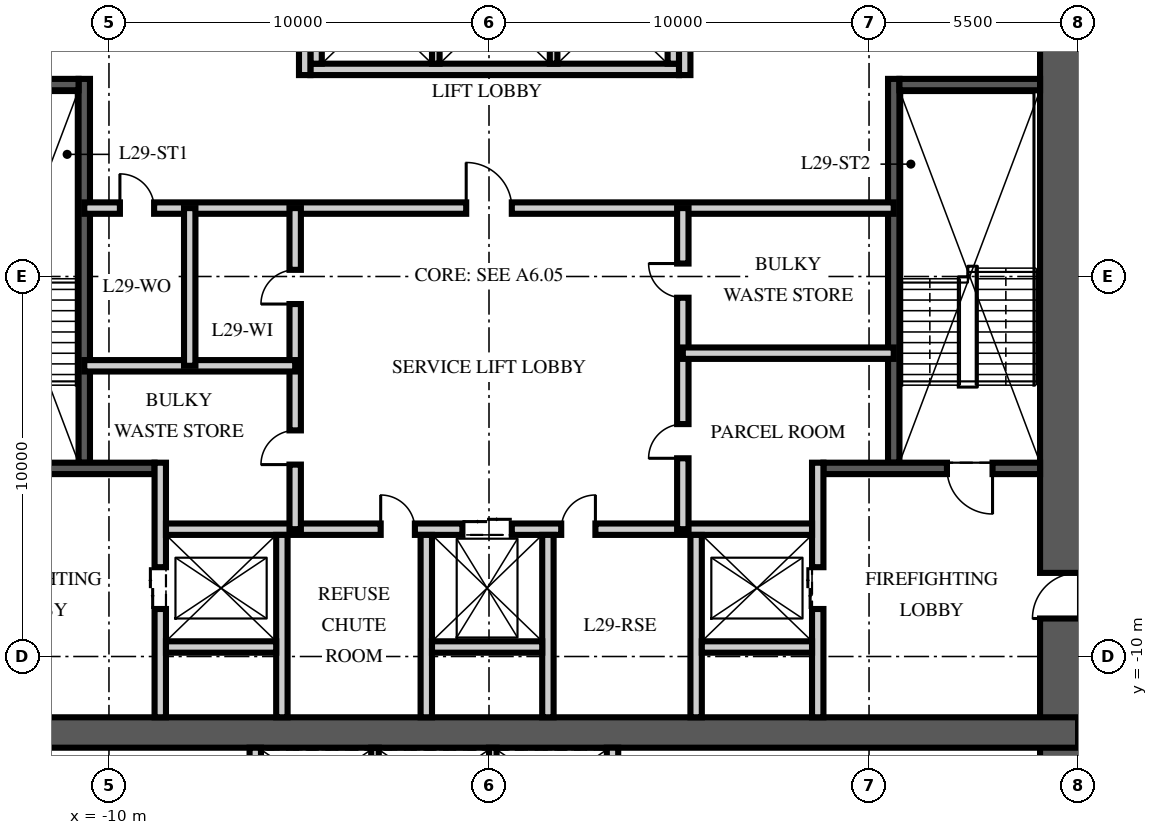
"""IFC4 building model, lengths in metres.
Left out: names, types, materials, properties, quantities, classifications, styles, units other than length and angle.
Written with IfcOpenShell. Run it as: python <this file> out.ifc"""

import sys

from ifc_helpers import new_model, si_unit, direction, frame, frame_2d, origin, place, context, subcontext, project, spatial, rectangle, extrude, element, fill, save


model = new_model("IFC4")
c1 = context("Model", 3, precision=1e-05, world=origin(), true_north=direction((0.0, 1.0)))
c2 = subcontext(c1, "Body", "Model", "MODEL_VIEW")
j1 = project(units=[si_unit("LENGTHUNIT", "METRE"), si_unit("PLANEANGLEUNIT", "RADIAN")], contexts=[c1])
p1 = place(None, origin())
s1 = spatial("IfcSite", under=j1, at=p1, CompositionType="ELEMENT")
p2 = place(p1, origin())
s2 = spatial("IfcBuilding", under=s1, at=p2, CompositionType="ELEMENT")
p3 = place(p2, frame((0.0, 0.0, 118.5)))
s3 = spatial("IfcBuildingStorey", under=s2, at=p3, CompositionType="ELEMENT", Elevation=118.5)
p4 = place(p3, frame((15.5, -15.5, -0.25), z_axis=(0.0, 0.0, 1.0), x_axis=(0.0, 1.0, 0.0)))
e1 = element("IfcWall", 1, at=p4, inside=s3, PredefinedType="SHEAR", context=c2, shape_type="SweptSolid", body=[
    extrude(rectangle(XDim=31.0, YDim=2.0, at=frame_2d((15.5, 0.0))), origin(), (0.0, 0.0, 1.0), 3.75),
])
p5 = place(p4, frame((6.5, 0.0, 0.25)))
e2 = element("IfcOpeningElement", 2, at=p5, cuts=e1, PredefinedType="OPENING", context=c2, shape_type="SweptSolid", body=[
    extrude(rectangle(XDim=1.2, YDim=2.1, at=frame_2d((0.6, 1.05))), frame((0.0, 1.01, 0.0), z_axis=(0.0, -1.0, 0.0), x_axis=(1.0, 0.0, 0.0)), (0.0, 0.0, 1.0), 2.02),
])
p6 = place(p4, frame((23.0, 0.0, 0.25)))
e3 = element("IfcOpeningElement", 3, at=p6, cuts=e1, PredefinedType="OPENING", context=c2, shape_type="SweptSolid", body=[
    extrude(rectangle(XDim=1.8, YDim=2.1, at=frame_2d((0.9, 1.05))), frame((0.0, 1.01, 0.0), z_axis=(0.0, -1.0, 0.0), x_axis=(1.0, 0.0, 0.0)), (0.0, 0.0, 1.0), 2.02),
])
p7 = place(p3, frame((-15.5, -12.0, -0.25), z_axis=(0.0, 0.0, 1.0), x_axis=(1.0, 0.0, 0.0)))
e4 = element("IfcWall", 4, at=p7, inside=s3, PredefinedType="SHEAR", context=c2, shape_type="SweptSolid", body=[
    extrude(rectangle(XDim=31.0, YDim=0.8, at=frame_2d((15.5, 0.0))), origin(), (0.0, 0.0, 1.0), 3.75),
])
p8 = place(p3, frame((-10.65, -4.9, 0.0), z_axis=(0.0, 0.0, 1.0), x_axis=(0.0, 1.0, 0.0)))
e5 = element("IfcWall", 5, at=p8, inside=s3, PredefinedType="SOLIDWALL", context=c2, shape_type="SweptSolid", body=[
    extrude(rectangle(XDim=10.1, YDim=0.3, at=frame_2d((5.05, 0.0))), origin(), (0.0, 0.0, 1.0), 3.5),
])
p9 = place(p3, frame((-14.5, -5.05, 0.0), z_axis=(0.0, 0.0, 1.0), x_axis=(1.0, 0.0, 0.0)))
e6 = element("IfcWall", 6, at=p9, inside=s3, PredefinedType="SOLIDWALL", context=c2, shape_type="SweptSolid", body=[
    extrude(rectangle(XDim=5.7, YDim=0.3, at=frame_2d((2.85, 0.0))), origin(), (0.0, 0.0, 1.0), 3.5),
])
p10 = place(p9, frame((1.25, 0.0, 0.0)))
e7 = element("IfcOpeningElement", 7, at=p10, cuts=e6, PredefinedType="OPENING", context=c2, shape_type="SweptSolid", body=[
    extrude(rectangle(XDim=1.2, YDim=2.1, at=frame_2d((0.6, 1.05))), frame((0.0, 0.16, 0.0), z_axis=(0.0, -1.0, 0.0), x_axis=(1.0, 0.0, 0.0)), (0.0, 0.0, 1.0), 0.32),
])
p11 = place(p3, frame((-14.5, 5.05, 0.0), z_axis=(0.0, 0.0, 1.0), x_axis=(1.0, 0.0, 0.0)))
e8 = element("IfcWall", 8, at=p11, inside=s3, PredefinedType="SOLIDWALL", context=c2, shape_type="SweptSolid", body=[
    extrude(rectangle(XDim=3.7, YDim=0.3, at=frame_2d((1.85, 0.0))), origin(), (0.0, 0.0, 1.0), 3.5),
])
p12 = place(p3, frame((-8.65, -11.6, 0.0), z_axis=(0.0, 0.0, 1.0), x_axis=(0.0, 1.0, 0.0)))
e9 = element("IfcWall", 9, at=p12, inside=s3, PredefinedType="PARTITIONING", context=c2, shape_type="SweptSolid", body=[
    extrude(rectangle(XDim=6.7, YDim=0.3, at=frame_2d((3.35, 0.0))), origin(), (0.0, 0.0, 1.0), 3.5),
])
p13 = place(p12, frame((2.85, 0.0, 0.0)))
e10 = element("IfcOpeningElement", 10, at=p13, cuts=e9, PredefinedType="OPENING", context=c2, shape_type="SweptSolid", body=[
    extrude(rectangle(XDim=1.1, YDim=2.1, at=frame_2d((0.55, 1.05))), frame((0.0, 0.16, 0.0), z_axis=(0.0, -1.0, 0.0), x_axis=(1.0, 0.0, 0.0)), (0.0, 0.0, 1.0), 0.32),
])
p14 = place(p3, frame((10.65, -4.9, 0.0), z_axis=(0.0, 0.0, 1.0), x_axis=(0.0, 1.0, 0.0)))
e11 = element("IfcWall", 11, at=p14, inside=s3, PredefinedType="SOLIDWALL", context=c2, shape_type="SweptSolid", body=[
    extrude(rectangle(XDim=10.1, YDim=0.3, at=frame_2d((5.05, 0.0))), origin(), (0.0, 0.0, 1.0), 3.5),
])
p15 = place(p3, frame((14.5, -5.05, 0.0), z_axis=(0.0, 0.0, 1.0), x_axis=(-1.0, 0.0, 0.0)))
e12 = element("IfcWall", 12, at=p15, inside=s3, PredefinedType="SOLIDWALL", context=c2, shape_type="SweptSolid", body=[
    extrude(rectangle(XDim=5.7, YDim=0.3, at=frame_2d((2.85, 0.0))), origin(), (0.0, 0.0, 1.0), 3.5),
])
p16 = place(p15, frame((1.25, 0.0, 0.0)))
e13 = element("IfcOpeningElement", 13, at=p16, cuts=e12, PredefinedType="OPENING", context=c2, shape_type="SweptSolid", body=[
    extrude(rectangle(XDim=1.2, YDim=2.1, at=frame_2d((0.6, 1.05))), frame((0.0, 0.16, 0.0), z_axis=(0.0, -1.0, 0.0), x_axis=(1.0, 0.0, 0.0)), (0.0, 0.0, 1.0), 0.32),
])
p17 = place(p3, frame((14.5, 5.05, 0.0), z_axis=(0.0, 0.0, 1.0), x_axis=(-1.0, 0.0, 0.0)))
e14 = element("IfcWall", 14, at=p17, inside=s3, PredefinedType="SOLIDWALL", context=c2, shape_type="SweptSolid", body=[
    extrude(rectangle(XDim=3.7, YDim=0.3, at=frame_2d((1.85, 0.0))), origin(), (0.0, 0.0, 1.0), 3.5),
])
p18 = place(p3, frame((8.65, -11.6, 0.0), z_axis=(0.0, 0.0, 1.0), x_axis=(0.0, 1.0, 0.0)))
e15 = element("IfcWall", 15, at=p18, inside=s3, PredefinedType="PARTITIONING", context=c2, shape_type="SweptSolid", body=[
    extrude(rectangle(XDim=6.7, YDim=0.3, at=frame_2d((3.35, 0.0))), origin(), (0.0, 0.0, 1.0), 3.5),
])
p19 = place(p18, frame((2.85, 0.0, 0.0)))
e16 = element("IfcOpeningElement", 16, at=p19, cuts=e15, PredefinedType="OPENING", context=c2, shape_type="SweptSolid", body=[
    extrude(rectangle(XDim=1.1, YDim=2.1, at=frame_2d((0.55, 1.05))), frame((0.0, 0.16, 0.0), z_axis=(0.0, -1.0, 0.0), x_axis=(1.0, 0.0, 0.0)), (0.0, 0.0, 1.0), 0.32),
])
p20 = place(p3, frame((-8.5, -6.65, 0.0), z_axis=(0.0, 0.0, 1.0), x_axis=(1.0, 0.0, 0.0)))
e17 = element("IfcWall", 17, at=p20, inside=s3, PredefinedType="PARTITIONING", context=c2, shape_type="SweptSolid", body=[
    extrude(rectangle(XDim=17.0, YDim=0.3, at=frame_2d((8.5, 0.0))), origin(), (0.0, 0.0, 1.0), 3.5),
])
p21 = place(p20, frame((7.8, 0.0, 0.0)))
e18 = element("IfcOpeningElement", 18, at=p21, cuts=e17, PredefinedType="OPENING", context=c2, shape_type="SweptSolid", body=[
    extrude(rectangle(XDim=1.3, YDim=2.4, at=frame_2d((0.65, 1.2))), frame((0.0, 0.16, 0.0), z_axis=(0.0, -1.0, 0.0), x_axis=(1.0, 0.0, 0.0)), (0.0, 0.0, 1.0), 0.32),
])
p22 = place(p20, frame((5.65, 0.0, 0.0)))
e19 = element("IfcOpeningElement", 19, at=p22, cuts=e17, PredefinedType="OPENING", context=c2, shape_type="SweptSolid", body=[
    extrude(rectangle(XDim=0.9, YDim=2.1, at=frame_2d((0.45, 1.05))), frame((0.0, 0.16, 0.0), z_axis=(0.0, -1.0, 0.0), x_axis=(1.0, 0.0, 0.0)), (0.0, 0.0, 1.0), 0.32),
])
p23 = place(p20, frame((10.4, 0.0, 0.0)))
e20 = element("IfcOpeningElement", 20, at=p23, cuts=e17, PredefinedType="OPENING", context=c2, shape_type="SweptSolid", body=[
    extrude(rectangle(XDim=0.9, YDim=2.1, at=frame_2d((0.45, 1.05))), frame((0.0, 0.16, 0.0), z_axis=(0.0, -1.0, 0.0), x_axis=(1.0, 0.0, 0.0)), (0.0, 0.0, 1.0), 0.32),
])
for number, where, z_axis, x_axis in (
    (21, (-5.45, -11.6, 0.0), (0.0, 0.0, 1.0), (0.0, 1.0, 0.0)),
    (22, (-1.65, -11.6, 0.0), (0.0, 0.0, 1.0), (0.0, 1.0, 0.0)),
    (23, (1.55, -11.6, 0.0), (0.0, 0.0, 1.0), (0.0, 1.0, 0.0)),
    (24, (5.45, -11.6, 0.0), (0.0, 0.0, 1.0), (0.0, 1.0, 0.0)),
):
    element("IfcWall", number, at=place(p3, frame(where, z_axis=z_axis, x_axis=x_axis)), inside=s3, PredefinedType="PARTITIONING", context=c2, shape_type="SweptSolid", body=[
        extrude(rectangle(XDim=4.8, YDim=0.3, at=frame_2d((2.4, 0.0))), origin(), (0.0, 0.0, 1.0), 3.5),
    ])
for number, where, z_axis, x_axis in (
    (25, (-8.5, -9.75, 0.0), (0.0, 0.0, 1.0), (1.0, 0.0, 0.0)),
    (26, (-1.5, -9.75, 0.0), (0.0, 0.0, 1.0), (1.0, 0.0, 0.0)),
    (27, (5.6, -9.75, 0.0), (0.0, 0.0, 1.0), (1.0, 0.0, 0.0)),
):
    element("IfcWall", number, at=place(p3, frame(where, z_axis=z_axis, x_axis=x_axis)), inside=s3, PredefinedType="PARTITIONING", context=c2, shape_type="SweptSolid", body=[
        extrude(rectangle(XDim=2.9, YDim=0.3, at=frame_2d((1.45, 0.0))), origin(), (0.0, 0.0, 1.0), 3.5),
    ])
p24 = place(p3, frame((-4.7, 5.45, 0.0), z_axis=(0.0, 0.0, 1.0), x_axis=(1.0, 0.0, 0.0)))
e28 = element("IfcWall", 28, at=p24, inside=s3, PredefinedType="PARTITIONING", context=c2, shape_type="SweptSolid", body=[
    extrude(rectangle(XDim=9.7, YDim=0.3, at=frame_2d((4.85, 0.0))), origin(), (0.0, 0.0, 1.0), 3.5),
])
for number, where, z_axis, x_axis in (
    (29, (-4.55, 5.6, 0.0), (0.0, 0.0, 1.0), (0.0, 1.0, 0.0)),
    (30, (4.85, 5.6, 0.0), (0.0, 0.0, 1.0), (0.0, 1.0, 0.0)),
):
    element("IfcWall", number, at=place(p3, frame(where, z_axis=z_axis, x_axis=x_axis)), inside=s3, PredefinedType="PARTITIONING", context=c2, shape_type="SweptSolid", body=[
        extrude(rectangle(XDim=2.8, YDim=0.3, at=frame_2d((1.4, 0.0))), origin(), (0.0, 0.0, 1.0), 3.5),
    ])
for number, where, z_axis, x_axis in (
    (31, (-1.4, 5.6, 0.0), (0.0, 0.0, 1.0), (0.0, 1.0, 0.0)),
    (32, (1.7, 5.6, 0.0), (0.0, 0.0, 1.0), (0.0, 1.0, 0.0)),
):
    element("IfcWall", number, at=place(p3, frame(where, z_axis=z_axis, x_axis=x_axis)), inside=s3, PredefinedType="PARTITIONING", context=c2, shape_type="SweptSolid", body=[
        extrude(rectangle(XDim=2.8, YDim=0.2, at=frame_2d((1.4, 0.0))), origin(), (0.0, 0.0, 1.0), 3.5),
    ])
for number, where, z_axis, x_axis in (
    (33, (-6.15, -14.5, 0.0), (0.0, 0.0, 1.0), (0.0, 1.0, 0.0)),
    (34, (3.25, -14.5, 0.0), (0.0, 0.0, 1.0), (0.0, 1.0, 0.0)),
):
    element("IfcWall", number, at=place(p3, frame(where, z_axis=z_axis, x_axis=x_axis)), inside=s3, PredefinedType="PARTITIONING", context=c2, shape_type="SweptSolid", body=[
        extrude(rectangle(XDim=2.1, YDim=0.3, at=frame_2d((1.05, 0.0))), origin(), (0.0, 0.0, 1.0), 3.5),
    ])
for number, where, z_axis, x_axis in (
    (35, (-3.0, -14.5, 0.0), (0.0, 0.0, 1.0), (0.0, 1.0, 0.0)),
    (36, (0.1, -14.5, 0.0), (0.0, 0.0, 1.0), (0.0, 1.0, 0.0)),
):
    element("IfcWall", number, at=place(p3, frame(where, z_axis=z_axis, x_axis=x_axis)), inside=s3, PredefinedType="PARTITIONING", context=c2, shape_type="SweptSolid", body=[
        extrude(rectangle(XDim=2.1, YDim=0.2, at=frame_2d((1.05, 0.0))), origin(), (0.0, 0.0, 1.0), 3.5),
    ])
p25 = place(p3, frame((-10.65, 1.8, 0.0), z_axis=(0.0, 0.0, 1.0), x_axis=(1.0, 0.0, 0.0)))
e37 = element("IfcWall", 37, at=p25, inside=s3, PredefinedType="PARTITIONING", context=c2, shape_type="SweptSolid", body=[
    extrude(rectangle(XDim=21.3, YDim=0.3, at=frame_2d((10.65, 0.0))), origin(), (0.0, 0.0, 1.0), 3.5),
])
p26 = place(p25, frame((10.05, 0.0, 0.0)))
e38 = element("IfcOpeningElement", 38, at=p26, cuts=e37, PredefinedType="OPENING", context=c2, shape_type="SweptSolid", body=[
    extrude(rectangle(XDim=1.2, YDim=2.1, at=frame_2d((0.6, 1.05))), frame((0.0, 0.16, 0.0), z_axis=(0.0, -1.0, 0.0), x_axis=(1.0, 0.0, 0.0)), (0.0, 0.0, 1.0), 0.32),
])
p27 = place(p25, frame((0.938, 0.0, 0.0)))
e39 = element("IfcOpeningElement", 39, at=p27, cuts=e37, PredefinedType="OPENING", context=c2, shape_type="SweptSolid", body=[
    extrude(rectangle(XDim=0.9, YDim=2.1, at=frame_2d((0.45, 1.05))), frame((0.0, 0.16, 0.0), z_axis=(0.0, -1.0, 0.0), x_axis=(1.0, 0.0, 0.0)), (0.0, 0.0, 1.0), 0.32),
])
p28 = place(p3, frame((-5.1, -6.65, 0.0), z_axis=(0.0, 0.0, 1.0), x_axis=(0.0, 1.0, 0.0)))
e40 = element("IfcWall", 40, at=p28, inside=s3, PredefinedType="PARTITIONING", context=c2, shape_type="SweptSolid", body=[
    extrude(rectangle(XDim=8.45, YDim=0.3, at=frame_2d((4.225, 0.0))), origin(), (0.0, 0.0, 1.0), 3.5),
])
p29 = place(p28, frame((1.7, 0.0, 0.0)))
e41 = element("IfcOpeningElement", 41, at=p29, cuts=e40, PredefinedType="OPENING", context=c2, shape_type="SweptSolid", body=[
    extrude(rectangle(XDim=0.9, YDim=2.1, at=frame_2d((0.45, 1.05))), frame((0.0, 0.16, 0.0), z_axis=(0.0, -1.0, 0.0), x_axis=(1.0, 0.0, 0.0)), (0.0, 0.0, 1.0), 0.32),
])
p30 = place(p28, frame((5.925, 0.0, 0.0)))
e42 = element("IfcOpeningElement", 42, at=p30, cuts=e40, PredefinedType="OPENING", context=c2, shape_type="SweptSolid", body=[
    extrude(rectangle(XDim=0.9, YDim=2.1, at=frame_2d((0.45, 1.05))), frame((0.0, 0.16, 0.0), z_axis=(0.0, -1.0, 0.0), x_axis=(1.0, 0.0, 0.0)), (0.0, 0.0, 1.0), 0.32),
])
p31 = place(p3, frame((5.1, -6.65, 0.0), z_axis=(0.0, 0.0, 1.0), x_axis=(0.0, 1.0, 0.0)))
e43 = element("IfcWall", 43, at=p31, inside=s3, PredefinedType="PARTITIONING", context=c2, shape_type="SweptSolid", body=[
    extrude(rectangle(XDim=8.45, YDim=0.3, at=frame_2d((4.225, 0.0))), origin(), (0.0, 0.0, 1.0), 3.5),
])
p32 = place(p31, frame((1.866, 0.0, 0.0)))
e44 = element("IfcOpeningElement", 44, at=p32, cuts=e43, PredefinedType="OPENING", context=c2, shape_type="SweptSolid", body=[
    extrude(rectangle(XDim=0.9, YDim=2.1, at=frame_2d((0.45, 1.05))), frame((0.0, 0.16, 0.0), z_axis=(0.0, -1.0, 0.0), x_axis=(1.0, 0.0, 0.0)), (0.0, 0.0, 1.0), 0.32),
])
p33 = place(p31, frame((6.091, 0.0, 0.0)))
e45 = element("IfcOpeningElement", 45, at=p33, cuts=e43, PredefinedType="OPENING", context=c2, shape_type="SweptSolid", body=[
    extrude(rectangle(XDim=0.9, YDim=2.1, at=frame_2d((0.45, 1.05))), frame((0.0, 0.16, 0.0), z_axis=(0.0, -1.0, 0.0), x_axis=(1.0, 0.0, 0.0)), (0.0, 0.0, 1.0), 0.32),
])
p34 = place(p3, frame((-10.65, -2.35, 0.0), z_axis=(0.0, 0.0, 1.0), x_axis=(1.0, 0.0, 0.0)))
e46 = element("IfcWall", 46, at=p34, inside=s3, PredefinedType="PARTITIONING", context=c2, shape_type="SweptSolid", body=[
    extrude(rectangle(XDim=5.55, YDim=0.3, at=frame_2d((2.775, 0.0))), origin(), (0.0, 0.0, 1.0), 3.5),
])
p35 = place(p3, frame((-7.875, -2.35, 0.0), z_axis=(0.0, 0.0, 1.0), x_axis=(0.0, 1.0, 0.0)))
e47 = element("IfcWall", 47, at=p35, inside=s3, PredefinedType="PARTITIONING", context=c2, shape_type="SweptSolid", body=[
    extrude(rectangle(XDim=4.15, YDim=0.3, at=frame_2d((2.075, 0.0))), origin(), (0.0, 0.0, 1.0), 3.5),
])
p36 = place(p3, frame((10.65, -2.018, 0.0), z_axis=(0.0, 0.0, 1.0), x_axis=(-1.0, 0.0, 0.0)))
e48 = element("IfcWall", 48, at=p36, inside=s3, PredefinedType="PARTITIONING", context=c2, shape_type="SweptSolid", body=[
    extrude(rectangle(XDim=5.55, YDim=0.3, at=frame_2d((2.775, 0.0))), origin(), (0.0, 0.0, 1.0), 3.5),
])
p37 = place(p3, frame((-4.85, 5.3, 0.0), z_axis=(0.0, 0.0, 1.0), x_axis=(0.0, 1.0, 0.0)))
e49 = element("IfcWall", 49, at=p37, inside=s3, PredefinedType="PARTITIONING", context=c2, shape_type="SweptSolid", body=[
    extrude(rectangle(XDim=6.3, YDim=0.3, at=frame_2d((3.15, 0.0))), origin(), (0.0, 0.0, 1.0), 3.5),
])
p38 = place(p3, frame((5.15, 5.3, 0.0), z_axis=(0.0, 0.0, 1.0), x_axis=(0.0, 1.0, 0.0)))
e50 = element("IfcWall", 50, at=p38, inside=s3, PredefinedType="PARTITIONING", context=c2, shape_type="SweptSolid", body=[
    extrude(rectangle(XDim=6.3, YDim=0.3, at=frame_2d((3.15, 0.0))), origin(), (0.0, 0.0, 1.0), 3.5),
])
p39 = place(p38, frame((4.35, 0.0, 0.0)))
e51 = element("IfcOpeningElement", 51, at=p39, cuts=e50, PredefinedType="OPENING", context=c2, shape_type="SweptSolid", body=[
    extrude(rectangle(XDim=0.9, YDim=2.1, at=frame_2d((0.45, 1.05))), frame((0.0, 0.16, 0.0), z_axis=(0.0, -1.0, 0.0), x_axis=(1.0, 0.0, 0.0)), (0.0, 0.0, 1.0), 0.32),
])
p40 = place(p16, origin())
e52 = element("IfcDoor", 52, at=p40, inside=s3, OperationType="SINGLE_SWING_LEFT", PredefinedType="DOOR", context=c2, shape_type="SweptSolid", body=[
    extrude(rectangle(XDim=1.2, YDim=2.1, at=frame_2d((0.6, 1.05))), frame((0.0, 0.025, 0.0), z_axis=(0.0, -1.0, 0.0), x_axis=(1.0, 0.0, 0.0)), (0.0, 0.0, 1.0), 0.05),
])
fill(e13, e52)
p41 = place(p5, origin())
e53 = element("IfcDoor", 53, at=p41, inside=s3, OperationType="SINGLE_SWING_LEFT", PredefinedType="DOOR", context=c2, shape_type="SweptSolid", body=[
    extrude(rectangle(XDim=1.2, YDim=2.1, at=frame_2d((0.6, 1.05))), frame((0.0, 0.025, 0.0), z_axis=(0.0, -1.0, 0.0), x_axis=(1.0, 0.0, 0.0)), (0.0, 0.0, 1.0), 0.05),
])
fill(e2, e53)
p42 = place(p13, origin())
e54 = element("IfcDoor", 54, at=p42, inside=s3, OperationType="DOUBLE_DOOR_SLIDING", PredefinedType="DOOR", context=c2, shape_type="SweptSolid", body=[
    extrude(rectangle(XDim=1.1, YDim=2.1, at=frame_2d((0.55, 1.05))), frame((0.0, 0.025, 0.0), z_axis=(0.0, -1.0, 0.0), x_axis=(1.0, 0.0, 0.0)), (0.0, 0.0, 1.0), 0.05),
])
fill(e10, e54)
p43 = place(p19, origin())
e55 = element("IfcDoor", 55, at=p43, inside=s3, OperationType="DOUBLE_DOOR_SLIDING", PredefinedType="DOOR", context=c2, shape_type="SweptSolid", body=[
    extrude(rectangle(XDim=1.1, YDim=2.1, at=frame_2d((0.55, 1.05))), frame((0.0, 0.025, 0.0), z_axis=(0.0, -1.0, 0.0), x_axis=(1.0, 0.0, 0.0)), (0.0, 0.0, 1.0), 0.05),
])
fill(e16, e55)
p44 = place(p21, origin())
e56 = element("IfcDoor", 56, at=p44, inside=s3, OperationType="DOUBLE_DOOR_SLIDING", PredefinedType="DOOR", context=c2, shape_type="SweptSolid", body=[
    extrude(rectangle(XDim=1.3, YDim=2.4, at=frame_2d((0.65, 1.2))), frame((0.0, 0.025, 0.0), z_axis=(0.0, -1.0, 0.0), x_axis=(1.0, 0.0, 0.0)), (0.0, 0.0, 1.0), 0.05),
])
fill(e18, e56)
p45 = place(p26, origin())
e57 = element("IfcDoor", 57, at=p45, inside=s3, OperationType="SINGLE_SWING_LEFT", PredefinedType="DOOR", context=c2, shape_type="SweptSolid", body=[
    extrude(rectangle(XDim=1.2, YDim=2.1, at=frame_2d((0.6, 1.05))), frame((0.0, 0.025, 0.0), z_axis=(0.0, -1.0, 0.0), x_axis=(1.0, 0.0, 0.0)), (0.0, 0.0, 1.0), 0.05),
])
fill(e38, e57)
p46 = place(p22, origin())
e58 = element("IfcDoor", 58, at=p46, inside=s3, OperationType="SINGLE_SWING_LEFT", PredefinedType="DOOR", context=c2, shape_type="SweptSolid", body=[
    extrude(rectangle(XDim=0.9, YDim=2.1, at=frame_2d((0.45, 1.05))), frame((0.0, 0.025, 0.0), z_axis=(0.0, -1.0, 0.0), x_axis=(1.0, 0.0, 0.0)), (0.0, 0.0, 1.0), 0.05),
])
fill(e19, e58)
p47 = place(p23, origin())
e59 = element("IfcDoor", 59, at=p47, inside=s3, OperationType="SINGLE_SWING_RIGHT", PredefinedType="DOOR", context=c2, shape_type="SweptSolid", body=[
    extrude(rectangle(XDim=0.9, YDim=2.1, at=frame_2d((0.45, 1.05))), frame((0.0, 0.025, 0.0), z_axis=(0.0, -1.0, 0.0), x_axis=(1.0, 0.0, 0.0)), (0.0, 0.0, 1.0), 0.05),
])
fill(e20, e59)
p48 = place(p29, origin())
e60 = element("IfcDoor", 60, at=p48, inside=s3, OperationType="SINGLE_SWING_LEFT", PredefinedType="DOOR", context=c2, shape_type="SweptSolid", body=[
    extrude(rectangle(XDim=0.9, YDim=2.1, at=frame_2d((0.45, 1.05))), frame((0.0, 0.025, 0.0), z_axis=(0.0, -1.0, 0.0), x_axis=(1.0, 0.0, 0.0)), (0.0, 0.0, 1.0), 0.05),
])
fill(e41, e60)
p49 = place(p30, origin())
e61 = element("IfcDoor", 61, at=p49, inside=s3, OperationType="SINGLE_SWING_LEFT", PredefinedType="DOOR", context=c2, shape_type="SweptSolid", body=[
    extrude(rectangle(XDim=0.9, YDim=2.1, at=frame_2d((0.45, 1.05))), frame((0.0, 0.025, 0.0), z_axis=(0.0, -1.0, 0.0), x_axis=(1.0, 0.0, 0.0)), (0.0, 0.0, 1.0), 0.05),
])
fill(e42, e61)
p50 = place(p27, origin())
e62 = element("IfcDoor", 62, at=p50, inside=s3, OperationType="SINGLE_SWING_LEFT", PredefinedType="DOOR", context=c2, shape_type="SweptSolid", body=[
    extrude(rectangle(XDim=0.9, YDim=2.1, at=frame_2d((0.45, 1.05))), frame((0.0, 0.025, 0.0), z_axis=(0.0, -1.0, 0.0), x_axis=(1.0, 0.0, 0.0)), (0.0, 0.0, 1.0), 0.05),
])
fill(e39, e62)
p51 = place(p32, origin())
e63 = element("IfcDoor", 63, at=p51, inside=s3, OperationType="SINGLE_SWING_LEFT", PredefinedType="DOOR", context=c2, shape_type="SweptSolid", body=[
    extrude(rectangle(XDim=0.9, YDim=2.1, at=frame_2d((0.45, 1.05))), frame((0.0, 0.025, 0.0), z_axis=(0.0, -1.0, 0.0), x_axis=(1.0, 0.0, 0.0)), (0.0, 0.0, 1.0), 0.05),
])
fill(e44, e63)
p52 = place(p33, origin())
e64 = element("IfcDoor", 64, at=p52, inside=s3, OperationType="SINGLE_SWING_RIGHT", PredefinedType="DOOR", context=c2, shape_type="SweptSolid", body=[
    extrude(rectangle(XDim=0.9, YDim=2.1, at=frame_2d((0.45, 1.05))), frame((0.0, 0.025, 0.0), z_axis=(0.0, -1.0, 0.0), x_axis=(1.0, 0.0, 0.0)), (0.0, 0.0, 1.0), 0.05),
])
fill(e45, e64)
save(model, sys.argv[1])
